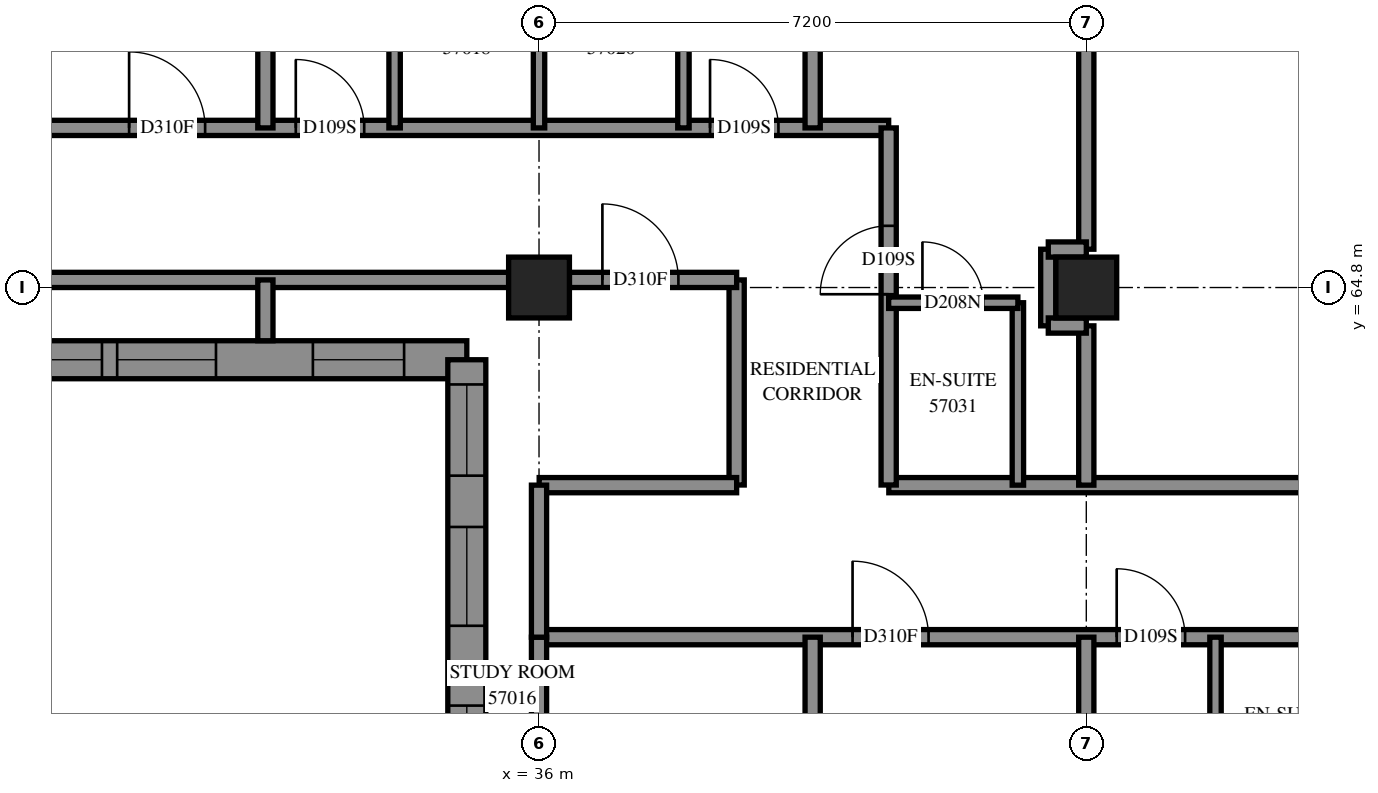
"""IFC4 building model, lengths in metres.
Left out: names, types, materials, properties, quantities, classifications, styles, units other than length and angle.
Written with IfcOpenShell. Run it as: python <this file> out.ifc"""

import sys

from ifc_helpers import new_model, si_unit, direction, frame, frame_2d, origin, origin_2d, place, context, subcontext, project, spatial, polyline, rectangle, outline, extrude, element, fill, save


model = new_model("IFC4")
c1 = context("Model", 3, precision=1e-05, world=origin(), true_north=direction((0.0, 1.0)))
c2 = subcontext(c1, "Body", "Model", "MODEL_VIEW")
j1 = project(units=[si_unit("LENGTHUNIT", "METRE"), si_unit("PLANEANGLEUNIT", "RADIAN")], contexts=[c1])
p1 = place(None, origin())
s1 = spatial("IfcSite", under=j1, at=p1, CompositionType="ELEMENT")
p2 = place(p1, origin())
s2 = spatial("IfcBuilding", under=s1, at=p2, CompositionType="ELEMENT")
p3 = place(p2, frame((0.0, 0.0, 210.0)))
s3 = spatial("IfcBuildingStorey", under=s2, at=p3, CompositionType="ELEMENT", Elevation=210.0)
for number, where, z_axis, x_axis in (
    (1, (36.0, 64.8, 0.0), (0.0, 0.0, 1.0), (1.0, 0.0, 0.0)),
    (2, (43.2, 64.8, 0.0), (0.0, 0.0, 1.0), (1.0, 0.0, 0.0)),
):
    element("IfcColumn", number, at=place(p3, frame(where, z_axis=z_axis, x_axis=x_axis)), inside=s3, PredefinedType="COLUMN", context=c2, shape_type="SweptSolid", body=[
        extrude(rectangle(XDim=0.8, YDim=0.8, at=origin_2d()), origin(), (0.0, 0.0, 1.0), 3.1),
    ])
p4 = place(p3, frame((26.768, 63.85, 0.0), z_axis=(0.0, 0.0, 1.0), x_axis=(1.0, 0.0, 0.0)))
e3 = element("IfcWall", 3, at=p4, inside=s3, PredefinedType="SOLIDWALL", context=c2, shape_type="SweptSolid", body=[
    extrude(outline(polyline([(-0.25, -0.25), (8.032, -0.25), (8.532, 0.25), (0.25, 0.25), (-0.25, -0.25)])), origin(), (0.0, 0.0, 1.0), 3.1),
])
p5 = place(p4, frame((2.182, 0.0, 0.45)))
e4 = element("IfcOpeningElement", 4, at=p5, cuts=e3, PredefinedType="OPENING", context=c2, shape_type="SweptSolid", body=[
    extrude(rectangle(XDim=1.3, YDim=2.5, at=frame_2d((0.65, 1.25))), frame((0.0, 0.26, 0.0), z_axis=(0.0, -1.0, 0.0), x_axis=(1.0, 0.0, 0.0)), (0.0, 0.0, 1.0), 0.52),
])
p6 = place(p4, frame((3.682, 0.0, 0.45)))
e5 = element("IfcOpeningElement", 5, at=p6, cuts=e3, PredefinedType="OPENING", context=c2, shape_type="SweptSolid", body=[
    extrude(rectangle(XDim=1.3, YDim=2.5, at=frame_2d((0.65, 1.25))), frame((0.0, 0.26, 0.0), z_axis=(0.0, -1.0, 0.0), x_axis=(1.0, 0.0, 0.0)), (0.0, 0.0, 1.0), 0.52),
])
p7 = place(p4, frame((0.641, 0.0, 0.45)))
e6 = element("IfcOpeningElement", 6, at=p7, cuts=e3, PredefinedType="OPENING", context=c2, shape_type="SweptSolid", body=[
    extrude(rectangle(XDim=1.2, YDim=2.5, at=frame_2d((0.6, 1.25))), frame((0.0, 0.26, 0.0), z_axis=(0.0, -1.0, 0.0), x_axis=(1.0, 0.0, 0.0)), (0.0, 0.0, 1.0), 0.52),
])
p8 = place(p4, frame((6.257, 0.0, 0.45)))
e7 = element("IfcOpeningElement", 7, at=p8, cuts=e3, PredefinedType="OPENING", context=c2, shape_type="SweptSolid", body=[
    extrude(rectangle(XDim=1.2, YDim=2.5, at=frame_2d((0.6, 1.25))), frame((0.0, 0.26, 0.0), z_axis=(0.0, -1.0, 0.0), x_axis=(1.0, 0.0, 0.0)), (0.0, 0.0, 1.0), 0.52),
])
p9 = place(p3, frame((35.05, 63.85, 0.0), z_axis=(0.0, 0.0, 1.0), x_axis=(0.0, -1.0, 0.0)))
e8 = element("IfcWall", 8, at=p9, inside=s3, PredefinedType="SOLIDWALL", context=c2, shape_type="SweptSolid", body=[
    extrude(outline(polyline([(0.25, -0.25), (7.45, -0.25), (6.95, 0.25), (-0.25, 0.25), (0.25, -0.25)])), origin(), (0.0, 0.0, 1.0), 3.1),
])
p10 = place(p9, frame((2.2, 0.0, 0.45)))
e9 = element("IfcOpeningElement", 9, at=p10, cuts=e8, PredefinedType="OPENING", context=c2, shape_type="SweptSolid", body=[
    extrude(rectangle(XDim=1.3, YDim=2.5, at=frame_2d((0.65, 1.25))), frame((0.0, 0.26, 0.0), z_axis=(0.0, -1.0, 0.0), x_axis=(1.0, 0.0, 0.0)), (0.0, 0.0, 1.0), 0.52),
])
p11 = place(p9, frame((4.55, 0.0, 0.45)))
e10 = element("IfcOpeningElement", 10, at=p11, cuts=e8, PredefinedType="OPENING", context=c2, shape_type="SweptSolid", body=[
    extrude(rectangle(XDim=1.3, YDim=2.5, at=frame_2d((0.65, 1.25))), frame((0.0, 0.26, 0.0), z_axis=(0.0, -1.0, 0.0), x_axis=(1.0, 0.0, 0.0)), (0.0, 0.0, 1.0), 0.52),
])
p12 = place(p9, frame((0.325, 0.0, 0.45)))
e11 = element("IfcOpeningElement", 11, at=p12, cuts=e8, PredefinedType="OPENING", context=c2, shape_type="SweptSolid", body=[
    extrude(rectangle(XDim=1.2, YDim=2.5, at=frame_2d((0.6, 1.25))), frame((0.0, 0.26, 0.0), z_axis=(0.0, -1.0, 0.0), x_axis=(1.0, 0.0, 0.0)), (0.0, 0.0, 1.0), 0.52),
])
p13 = place(p3, frame((36.0, 60.2, 0.0), z_axis=(0.0, 0.0, 1.0), x_axis=(1.0, 0.0, 0.0)))
e12 = element("IfcWall", 12, at=p13, inside=s3, PredefinedType="PARTITIONING", context=c2, shape_type="SweptSolid", body=[
    extrude(rectangle(XDim=17.0, YDim=0.2, at=frame_2d((8.5, 0.0))), origin(), (0.0, 0.0, 1.0), 3.1),
])
p14 = place(p13, frame((4.125, 0.0, 0.0)))
e13 = element("IfcOpeningElement", 13, at=p14, cuts=e12, PredefinedType="OPENING", context=c2, shape_type="SweptSolid", body=[
    extrude(rectangle(XDim=1.0, YDim=2.1, at=frame_2d((0.5, 1.05))), frame((0.0, 0.11, 0.0), z_axis=(0.0, -1.0, 0.0), x_axis=(1.0, 0.0, 0.0)), (0.0, 0.0, 1.0), 0.22),
])
p15 = place(p13, frame((7.6, 0.0, 0.0)))
e14 = element("IfcOpeningElement", 14, at=p15, cuts=e12, PredefinedType="OPENING", context=c2, shape_type="SweptSolid", body=[
    extrude(rectangle(XDim=0.9, YDim=2.1, at=frame_2d((0.45, 1.05))), frame((0.0, 0.11, 0.0), z_axis=(0.0, -1.0, 0.0), x_axis=(1.0, 0.0, 0.0)), (0.0, 0.0, 1.0), 0.22),
])
p16 = place(p13, frame((11.48, 0.0, 0.0)))
e15 = element("IfcOpeningElement", 15, at=p16, cuts=e12, PredefinedType="OPENING", context=c2, shape_type="SweptSolid", body=[
    extrude(rectangle(XDim=1.0, YDim=2.1, at=frame_2d((0.5, 1.05))), frame((0.0, 0.11, 0.0), z_axis=(0.0, -1.0, 0.0), x_axis=(1.0, 0.0, 0.0)), (0.0, 0.0, 1.0), 0.22),
])
p17 = place(p13, frame((15.805, 0.0, 0.0)))
e16 = element("IfcOpeningElement", 16, at=p17, cuts=e12, PredefinedType="OPENING", context=c2, shape_type="SweptSolid", body=[
    extrude(rectangle(XDim=1.0, YDim=2.1, at=frame_2d((0.5, 1.05))), frame((0.0, 0.11, 0.0), z_axis=(0.0, -1.0, 0.0), x_axis=(1.0, 0.0, 0.0)), (0.0, 0.0, 1.0), 0.22),
])
p18 = place(p3, frame((40.602, 62.2, 0.0), z_axis=(0.0, 0.0, 1.0), x_axis=(1.0, 0.0, 0.0)))
e17 = element("IfcWall", 17, at=p18, inside=s3, PredefinedType="PARTITIONING", context=c2, shape_type="SweptSolid", body=[
    extrude(rectangle(XDim=14.998, YDim=0.2, at=frame_2d((7.499, 0.0))), origin(), (0.0, 0.0, 1.0), 3.1),
])
p19 = place(p18, frame((6.308, 0.0, 0.0)))
e18 = element("IfcOpeningElement", 18, at=p19, cuts=e17, PredefinedType="OPENING", context=c2, shape_type="SweptSolid", body=[
    extrude(rectangle(XDim=1.0, YDim=2.1, at=frame_2d((0.5, 1.05))), frame((0.0, 0.11, 0.0), z_axis=(0.0, -1.0, 0.0), x_axis=(1.0, 0.0, 0.0)), (0.0, 0.0, 1.0), 0.22),
])
p20 = place(p18, frame((9.928, 0.0, 0.0)))
e19 = element("IfcOpeningElement", 19, at=p20, cuts=e17, PredefinedType="OPENING", context=c2, shape_type="SweptSolid", body=[
    extrude(rectangle(XDim=0.9, YDim=2.1, at=frame_2d((0.45, 1.05))), frame((0.0, 0.11, 0.0), z_axis=(0.0, -1.0, 0.0), x_axis=(1.0, 0.0, 0.0)), (0.0, 0.0, 1.0), 0.22),
])
p21 = place(p18, frame((13.746, 0.0, 0.0)))
e20 = element("IfcOpeningElement", 20, at=p21, cuts=e17, PredefinedType="OPENING", context=c2, shape_type="SweptSolid", body=[
    extrude(rectangle(XDim=1.0, YDim=2.1, at=frame_2d((0.5, 1.05))), frame((0.0, 0.11, 0.0), z_axis=(0.0, -1.0, 0.0), x_axis=(1.0, 0.0, 0.0)), (0.0, 0.0, 1.0), 0.22),
])
p22 = place(p3, frame((28.802, 66.9, 0.0), z_axis=(0.0, 0.0, 1.0), x_axis=(1.0, 0.0, 0.0)))
e21 = element("IfcWall", 21, at=p22, inside=s3, PredefinedType="PARTITIONING", context=c2, shape_type="SweptSolid", body=[
    extrude(rectangle(XDim=11.798, YDim=0.2, at=frame_2d((5.899, 0.0))), origin(), (0.0, 0.0, 1.0), 3.1),
])
p23 = place(p22, frame((1.805, 0.0, 0.0)))
e22 = element("IfcOpeningElement", 22, at=p23, cuts=e21, PredefinedType="OPENING", context=c2, shape_type="SweptSolid", body=[
    extrude(rectangle(XDim=1.0, YDim=2.1, at=frame_2d((0.5, 1.05))), frame((0.0, 0.11, 0.0), z_axis=(0.0, -1.0, 0.0), x_axis=(1.0, 0.0, 0.0)), (0.0, 0.0, 1.0), 0.22),
])
p24 = place(p22, frame((3.998, 0.0, 0.0)))
e23 = element("IfcOpeningElement", 23, at=p24, cuts=e21, PredefinedType="OPENING", context=c2, shape_type="SweptSolid", body=[
    extrude(rectangle(XDim=0.9, YDim=2.1, at=frame_2d((0.45, 1.05))), frame((0.0, 0.11, 0.0), z_axis=(0.0, -1.0, 0.0), x_axis=(1.0, 0.0, 0.0)), (0.0, 0.0, 1.0), 0.22),
])
p25 = place(p22, frame((9.448, 0.0, 0.0)))
e24 = element("IfcOpeningElement", 24, at=p25, cuts=e21, PredefinedType="OPENING", context=c2, shape_type="SweptSolid", body=[
    extrude(rectangle(XDim=0.9, YDim=2.1, at=frame_2d((0.45, 1.05))), frame((0.0, 0.11, 0.0), z_axis=(0.0, -1.0, 0.0), x_axis=(1.0, 0.0, 0.0)), (0.0, 0.0, 1.0), 0.22),
])
p26 = place(p3, frame((29.2, 64.9, 0.0), z_axis=(0.0, 0.0, 1.0), x_axis=(1.0, 0.0, 0.0)))
e25 = element("IfcWall", 25, at=p26, inside=s3, PredefinedType="PARTITIONING", context=c2, shape_type="SweptSolid", body=[
    extrude(rectangle(XDim=6.4, YDim=0.2, at=frame_2d((3.2, 0.0))), origin(), (0.0, 0.0, 1.0), 2.6),
])
p27 = place(p3, frame((43.2, 65.304, 0.0), z_axis=(0.0, 0.0, 1.0), x_axis=(0.0, 1.0, 0.0)))
e26 = element("IfcWall", 26, at=p27, inside=s3, PredefinedType="PARTITIONING", context=c2, shape_type="SweptSolid", body=[
    extrude(rectangle(XDim=6.192, YDim=0.2, at=frame_2d((3.096, 0.0))), origin(), (0.0, 0.0, 1.0), 3.1),
])
p28 = place(p3, frame((32.4, 66.9, 0.0), z_axis=(0.0, 0.0, 1.0), x_axis=(0.0, 1.0, 0.0)))
e27 = element("IfcWall", 27, at=p28, inside=s3, PredefinedType="PARTITIONING", context=c2, shape_type="SweptSolid", body=[
    extrude(rectangle(XDim=6.054, YDim=0.2, at=frame_2d((3.027, 0.0))), origin(), (0.0, 0.0, 1.0), 3.1),
])
p29 = place(p3, frame((39.6, 66.9, 0.0), z_axis=(0.0, 0.0, 1.0), x_axis=(0.0, 1.0, 0.0)))
e28 = element("IfcWall", 28, at=p29, inside=s3, PredefinedType="PARTITIONING", context=c2, shape_type="SweptSolid", body=[
    extrude(rectangle(XDim=5.996, YDim=0.2, at=frame_2d((2.998, 0.0))), origin(), (0.0, 0.0, 1.0), 3.1),
])
p30 = place(p3, frame((40.6, 62.202, 0.0), z_axis=(0.0, 0.0, 1.0), x_axis=(0.0, 1.0, 0.0)))
e29 = element("IfcWall", 29, at=p30, inside=s3, PredefinedType="PARTITIONING", context=c2, shape_type="SweptSolid", body=[
    extrude(rectangle(XDim=4.698, YDim=0.2, at=frame_2d((2.349, 0.0))), origin(), (0.0, 0.0, 1.0), 3.1),
])
p31 = place(p30, frame((2.51, 0.0, 0.0)))
e30 = element("IfcOpeningElement", 30, at=p31, cuts=e29, PredefinedType="OPENING", context=c2, shape_type="SweptSolid", body=[
    extrude(rectangle(XDim=0.9, YDim=2.1, at=frame_2d((0.45, 1.05))), frame((0.0, 0.11, 0.0), z_axis=(0.0, -1.0, 0.0), x_axis=(1.0, 0.0, 0.0)), (0.0, 0.0, 1.0), 0.22),
])
p32 = place(p3, frame((39.6, 56.9, 0.0), z_axis=(0.0, 0.0, 1.0), x_axis=(0.0, 1.0, 0.0)))
e31 = element("IfcWall", 31, at=p32, inside=s3, PredefinedType="PARTITIONING", context=c2, shape_type="SweptSolid", body=[
    extrude(rectangle(XDim=3.3, YDim=0.2, at=frame_2d((1.65, 0.0))), origin(), (0.0, 0.0, 1.0), 3.1),
])
p33 = place(p3, frame((38.6, 62.202, 0.0), z_axis=(0.0, 0.0, 1.0), x_axis=(0.0, 1.0, 0.0)))
e32 = element("IfcWall", 32, at=p33, inside=s3, PredefinedType="PARTITIONING", context=c2, shape_type="SweptSolid", body=[
    extrude(rectangle(XDim=2.698, YDim=0.2, at=frame_2d((1.349, 0.0))), origin(), (0.0, 0.0, 1.0), 3.1),
])
p34 = place(p3, frame((36.002, 62.2, 0.0), z_axis=(0.0, 0.0, 1.0), x_axis=(1.0, 0.0, 0.0)))
e33 = element("IfcWall", 33, at=p34, inside=s3, PredefinedType="PARTITIONING", context=c2, shape_type="SweptSolid", body=[
    extrude(rectangle(XDim=2.598, YDim=0.2, at=frame_2d((1.299, 0.0))), origin(), (0.0, 0.0, 1.0), 3.1),
])
for number, where, z_axis, x_axis in (
    (34, (44.9, 57.8, 0.0), (0.0, 0.0, 1.0), (0.0, 1.0, 0.0)),
    (35, (34.1, 66.9, 0.0), (0.0, 0.0, 1.0), (0.0, 1.0, 0.0)),
    (36, (36.0, 66.9, 0.0), (0.0, 0.0, 1.0), (0.0, 1.0, 0.0)),
    (37, (37.9, 66.9, 0.0), (0.0, 0.0, 1.0), (0.0, 1.0, 0.0)),
    (38, (42.3, 62.2, 0.0), (0.0, 0.0, 1.0), (0.0, 1.0, 0.0)),
):
    element("IfcWall", number, at=place(p3, frame(where, z_axis=z_axis, x_axis=x_axis)), inside=s3, PredefinedType="PARTITIONING", context=c2, shape_type="SweptSolid", body=[
        extrude(rectangle(XDim=2.4, YDim=0.15, at=frame_2d((1.2, 0.0))), origin(), (0.0, 0.0, 1.0), 3.1),
    ])
p35 = place(p3, frame((36.4, 64.9, 0.0), z_axis=(0.0, 0.0, 1.0), x_axis=(1.0, 0.0, 0.0)))
e39 = element("IfcWall", 39, at=p35, inside=s3, PredefinedType="PARTITIONING", context=c2, shape_type="SweptSolid", body=[
    extrude(rectangle(XDim=2.2, YDim=0.2, at=frame_2d((1.1, 0.0))), origin(), (0.0, 0.0, 1.0), 3.1),
])
p36 = place(p35, frame((0.434, 0.0, 0.0)))
e40 = element("IfcOpeningElement", 40, at=p36, cuts=e39, PredefinedType="OPENING", context=c2, shape_type="SweptSolid", body=[
    extrude(rectangle(XDim=1.0, YDim=2.1, at=frame_2d((0.5, 1.05))), frame((0.0, 0.11, 0.0), z_axis=(0.0, -1.0, 0.0), x_axis=(1.0, 0.0, 0.0)), (0.0, 0.0, 1.0), 0.22),
])
p37 = place(p3, frame((36.0, 58.0, 0.0), z_axis=(0.0, 0.0, 1.0), x_axis=(0.0, 1.0, 0.0)))
e41 = element("IfcWall", 41, at=p37, inside=s3, PredefinedType="PARTITIONING", context=c2, shape_type="SweptSolid", body=[
    extrude(rectangle(XDim=2.2, YDim=0.2, at=frame_2d((1.1, 0.0))), origin(), (0.0, 0.0, 1.0), 2.6),
])
p38 = place(p3, frame((43.2, 58.0, 0.0), z_axis=(0.0, 0.0, 1.0), x_axis=(0.0, 1.0, 0.0)))
e42 = element("IfcWall", 42, at=p38, inside=s3, PredefinedType="PARTITIONING", context=c2, shape_type="SweptSolid", body=[
    extrude(rectangle(XDim=2.2, YDim=0.2, at=frame_2d((1.1, 0.0))), origin(), (0.0, 0.0, 1.0), 3.1),
])
p39 = place(p3, frame((43.2, 62.2, 0.0), z_axis=(0.0, 0.0, 1.0), x_axis=(0.0, 1.0, 0.0)))
e43 = element("IfcWall", 43, at=p39, inside=s3, PredefinedType="PARTITIONING", context=c2, shape_type="SweptSolid", body=[
    extrude(rectangle(XDim=2.096, YDim=0.2, at=frame_2d((1.048, 0.0))), origin(), (0.0, 0.0, 1.0), 3.1),
])
p40 = place(p3, frame((36.0, 60.2, 0.0), z_axis=(0.0, 0.0, 1.0), x_axis=(0.0, 1.0, 0.0)))
e44 = element("IfcWall", 44, at=p40, inside=s3, PredefinedType="PARTITIONING", context=c2, shape_type="SweptSolid", body=[
    extrude(rectangle(XDim=2.0, YDim=0.2, at=frame_2d((1.0, 0.0))), origin(), (0.0, 0.0, 1.0), 2.6),
])
p41 = place(p3, frame((40.6, 64.6, 0.0), z_axis=(0.0, 0.0, 1.0), x_axis=(1.0, 0.0, 0.0)))
e45 = element("IfcWall", 45, at=p41, inside=s3, PredefinedType="PARTITIONING", context=c2, shape_type="SweptSolid", body=[
    extrude(rectangle(XDim=1.7, YDim=0.15, at=frame_2d((0.85, 0.0))), origin(), (0.0, 0.0, 1.0), 3.1),
])
p42 = place(p41, frame((0.444, 0.0, 0.0)))
e46 = element("IfcOpeningElement", 46, at=p42, cuts=e45, PredefinedType="OPENING", context=c2, shape_type="SweptSolid", body=[
    extrude(rectangle(XDim=0.8, YDim=2.1, at=frame_2d((0.4, 1.05))), frame((0.0, 0.085, 0.0), z_axis=(0.0, -1.0, 0.0), x_axis=(1.0, 0.0, 0.0)), (0.0, 0.0, 1.0), 0.17),
])
p43 = place(p3, frame((42.7, 64.296, 0.0), z_axis=(0.0, 0.0, 1.0), x_axis=(0.0, 1.0, 0.0)))
e47 = element("IfcWall", 47, at=p43, inside=s3, PredefinedType="PARTITIONING", context=c2, shape_type="SweptSolid", body=[
    extrude(rectangle(XDim=1.008, YDim=0.2, at=frame_2d((0.504, 0.0))), origin(), (0.0, 0.0, 1.0), 3.1),
])
p44 = place(p3, frame((32.4, 64.1, 0.0), z_axis=(0.0, 0.0, 1.0), x_axis=(0.0, 1.0, 0.0)))
e48 = element("IfcWall", 48, at=p44, inside=s3, PredefinedType="PARTITIONING", context=c2, shape_type="SweptSolid", body=[
    extrude(rectangle(XDim=0.8, YDim=0.2, at=frame_2d((0.4, 0.0))), origin(), (0.0, 0.0, 1.0), 3.1),
])
for number, where, z_axis, x_axis in (
    (49, (42.7, 65.3, 0.0), (0.0, 0.0, 1.0), (1.0, 0.0, 0.0)),
    (50, (42.7, 64.3, 0.0), (0.0, 0.0, 1.0), (1.0, 0.0, 0.0)),
):
    element("IfcWall", number, at=place(p3, frame(where, z_axis=z_axis, x_axis=x_axis)), inside=s3, PredefinedType="PARTITIONING", context=c2, shape_type="SweptSolid", body=[
        extrude(rectangle(XDim=0.5, YDim=0.2, at=frame_2d((0.25, 0.0))), origin(), (0.0, 0.0, 1.0), 3.1),
    ])
p45 = place(p5, origin())
e51 = element("IfcWindow", 51, at=p45, inside=s3, PartitioningType="SINGLE_PANEL", PredefinedType="WINDOW", context=c2, shape_type="SweptSolid", body=[
    extrude(rectangle(XDim=1.3, YDim=2.5, at=frame_2d((0.65, 1.25))), frame((0.0, 0.18, 0.0), z_axis=(0.0, -1.0, 0.0), x_axis=(1.0, 0.0, 0.0)), (0.0, 0.0, 1.0), 0.06),
])
fill(e4, e51)
p46 = place(p6, origin())
e52 = element("IfcWindow", 52, at=p46, inside=s3, PartitioningType="SINGLE_PANEL", PredefinedType="WINDOW", context=c2, shape_type="SweptSolid", body=[
    extrude(rectangle(XDim=1.3, YDim=2.5, at=frame_2d((0.65, 1.25))), frame((0.0, 0.18, 0.0), z_axis=(0.0, -1.0, 0.0), x_axis=(1.0, 0.0, 0.0)), (0.0, 0.0, 1.0), 0.06),
])
fill(e5, e52)
p47 = place(p8, origin())
e53 = element("IfcWindow", 53, at=p47, inside=s3, PartitioningType="SINGLE_PANEL", PredefinedType="WINDOW", context=c2, shape_type="SweptSolid", body=[
    extrude(rectangle(XDim=1.2, YDim=2.5, at=frame_2d((0.6, 1.25))), frame((0.0, 0.18, 0.0), z_axis=(0.0, -1.0, 0.0), x_axis=(1.0, 0.0, 0.0)), (0.0, 0.0, 1.0), 0.06),
])
fill(e7, e53)
p48 = place(p10, origin())
e54 = element("IfcWindow", 54, at=p48, inside=s3, PartitioningType="SINGLE_PANEL", PredefinedType="WINDOW", context=c2, shape_type="SweptSolid", body=[
    extrude(rectangle(XDim=1.3, YDim=2.5, at=frame_2d((0.65, 1.25))), frame((0.0, 0.18, 0.0), z_axis=(0.0, -1.0, 0.0), x_axis=(1.0, 0.0, 0.0)), (0.0, 0.0, 1.0), 0.06),
])
fill(e9, e54)
p49 = place(p11, origin())
e55 = element("IfcWindow", 55, at=p49, inside=s3, PartitioningType="SINGLE_PANEL", PredefinedType="WINDOW", context=c2, shape_type="SweptSolid", body=[
    extrude(rectangle(XDim=1.3, YDim=2.5, at=frame_2d((0.65, 1.25))), frame((0.0, 0.18, 0.0), z_axis=(0.0, -1.0, 0.0), x_axis=(1.0, 0.0, 0.0)), (0.0, 0.0, 1.0), 0.06),
])
fill(e10, e55)
p50 = place(p12, origin())
e56 = element("IfcWindow", 56, at=p50, inside=s3, PartitioningType="SINGLE_PANEL", PredefinedType="WINDOW", context=c2, shape_type="SweptSolid", body=[
    extrude(rectangle(XDim=1.2, YDim=2.5, at=frame_2d((0.6, 1.25))), frame((0.0, 0.18, 0.0), z_axis=(0.0, -1.0, 0.0), x_axis=(1.0, 0.0, 0.0)), (0.0, 0.0, 1.0), 0.06),
])
fill(e11, e56)
p51 = place(p23, origin())
e57 = element("IfcDoor", 57, at=p51, inside=s3, OperationType="SINGLE_SWING_RIGHT", PredefinedType="DOOR", context=c2, shape_type="SweptSolid", body=[
    extrude(rectangle(XDim=1.0, YDim=2.1, at=frame_2d((0.5, 1.05))), frame((0.0, 0.025, 0.0), z_axis=(0.0, -1.0, 0.0), x_axis=(1.0, 0.0, 0.0)), (0.0, 0.0, 1.0), 0.05),
])
fill(e22, e57)
p52 = place(p36, origin())
e58 = element("IfcDoor", 58, at=p52, inside=s3, OperationType="SINGLE_SWING_RIGHT", PredefinedType="DOOR", context=c2, shape_type="SweptSolid", body=[
    extrude(rectangle(XDim=1.0, YDim=2.1, at=frame_2d((0.5, 1.05))), frame((0.0, 0.025, 0.0), z_axis=(0.0, -1.0, 0.0), x_axis=(1.0, 0.0, 0.0)), (0.0, 0.0, 1.0), 0.05),
])
fill(e40, e58)
p53 = place(p24, origin())
e59 = element("IfcDoor", 59, at=p53, inside=s3, OperationType="SINGLE_SWING_LEFT", PredefinedType="DOOR", context=c2, shape_type="SweptSolid", body=[
    extrude(rectangle(XDim=0.9, YDim=2.1, at=frame_2d((0.45, 1.05))), frame((0.0, 0.025, 0.0), z_axis=(0.0, -1.0, 0.0), x_axis=(1.0, 0.0, 0.0)), (0.0, 0.0, 1.0), 0.05),
])
fill(e23, e59)
p54 = place(p25, origin())
e60 = element("IfcDoor", 60, at=p54, inside=s3, OperationType="SINGLE_SWING_RIGHT", PredefinedType="DOOR", context=c2, shape_type="SweptSolid", body=[
    extrude(rectangle(XDim=0.9, YDim=2.1, at=frame_2d((0.45, 1.05))), frame((0.0, 0.025, 0.0), z_axis=(0.0, -1.0, 0.0), x_axis=(1.0, 0.0, 0.0)), (0.0, 0.0, 1.0), 0.05),
])
fill(e24, e60)
p55 = place(p14, origin())
e61 = element("IfcDoor", 61, at=p55, inside=s3, OperationType="SINGLE_SWING_RIGHT", PredefinedType="DOOR", context=c2, shape_type="SweptSolid", body=[
    extrude(rectangle(XDim=1.0, YDim=2.1, at=frame_2d((0.5, 1.05))), frame((0.0, 0.025, 0.0), z_axis=(0.0, -1.0, 0.0), x_axis=(1.0, 0.0, 0.0)), (0.0, 0.0, 1.0), 0.05),
])
fill(e13, e61)
p56 = place(p15, origin())
e62 = element("IfcDoor", 62, at=p56, inside=s3, OperationType="SINGLE_SWING_LEFT", PredefinedType="DOOR", context=c2, shape_type="SweptSolid", body=[
    extrude(rectangle(XDim=0.9, YDim=2.1, at=frame_2d((0.45, 1.05))), frame((0.0, 0.025, 0.0), z_axis=(0.0, -1.0, 0.0), x_axis=(1.0, 0.0, 0.0)), (0.0, 0.0, 1.0), 0.05),
])
fill(e14, e62)
p57 = place(p31, origin())
e63 = element("IfcDoor", 63, at=p57, inside=s3, OperationType="SINGLE_SWING_LEFT", PredefinedType="DOOR", context=c2, shape_type="SweptSolid", body=[
    extrude(rectangle(XDim=0.9, YDim=2.1, at=frame_2d((0.45, 1.05))), frame((0.0, 0.025, 0.0), z_axis=(0.0, -1.0, 0.0), x_axis=(1.0, 0.0, 0.0)), (0.0, 0.0, 1.0), 0.05),
])
fill(e30, e63)
p58 = place(p42, origin())
e64 = element("IfcDoor", 64, at=p58, inside=s3, OperationType="SINGLE_SWING_RIGHT", PredefinedType="DOOR", context=c2, shape_type="SweptSolid", body=[
    extrude(rectangle(XDim=0.8, YDim=2.1, at=frame_2d((0.4, 1.05))), frame((0.0, 0.025, 0.0), z_axis=(0.0, -1.0, 0.0), x_axis=(1.0, 0.0, 0.0)), (0.0, 0.0, 1.0), 0.05),
])
fill(e46, e64)
save(model, sys.argv[1])
